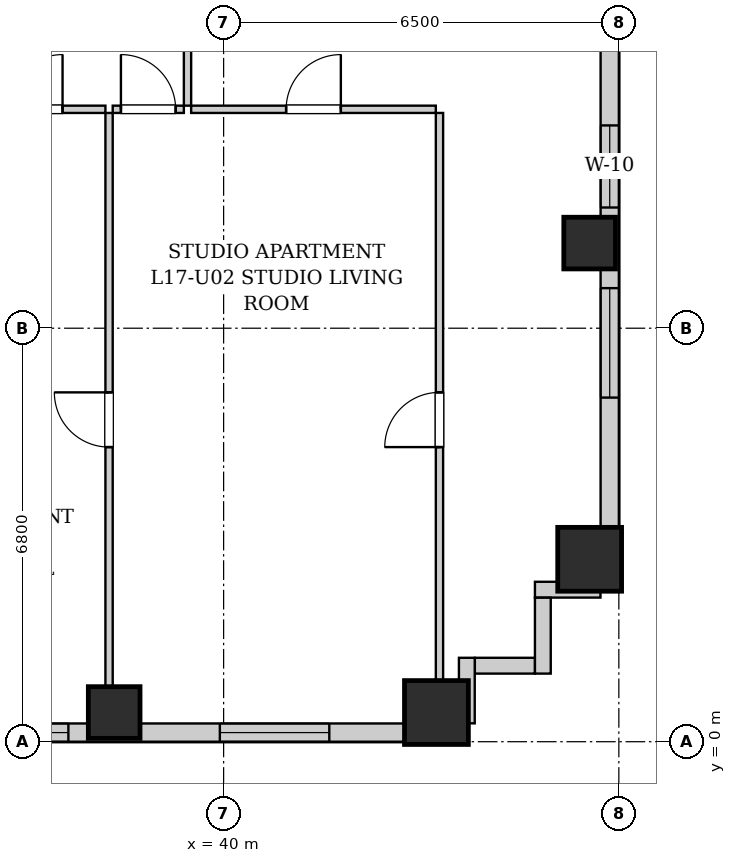
"""IFC4 building model, lengths in metres.
Left out: names, types, materials, properties, quantities, classifications, styles, units other than length and angle.
Written with IfcOpenShell. Run it as: python <this file> out.ifc"""

import sys

from ifc_helpers import new_model, si_unit, direction, frame, frame_2d, origin, origin_2d, place, context, subcontext, project, spatial, rectangle, extrude, element, fill, save


model = new_model("IFC4")
c1 = context("Model", 3, precision=1e-05, world=origin(), true_north=direction((0.0, 1.0)))
c2 = subcontext(c1, "Body", "Model", "MODEL_VIEW")
j1 = project(units=[si_unit("LENGTHUNIT", "METRE"), si_unit("PLANEANGLEUNIT", "RADIAN")], contexts=[c1])
p1 = place(None, origin())
s1 = spatial("IfcSite", under=j1, at=p1, CompositionType="ELEMENT")
p2 = place(p1, origin())
s2 = spatial("IfcBuilding", under=s1, at=p2, CompositionType="ELEMENT")
p3 = place(p2, frame((0.0, 0.0, 64.2)))
s3 = spatial("IfcBuildingStorey", under=s2, at=p3, CompositionType="ELEMENT", Elevation=64.2)
p4 = place(p3, frame((38.2, 0.48, 0.0), z_axis=(0.0, 0.0, 1.0), x_axis=(1.0, 0.0, 0.0)))
e1 = element("IfcColumn", 1, at=p4, inside=s3, PredefinedType="COLUMN", context=c2, shape_type="SweptSolid", body=[
    extrude(rectangle(XDim=0.85, YDim=0.85, at=origin_2d()), origin(), (0.0, 0.0, 1.0), 3.2),
])
for number, where, z_axis, x_axis in (
    (2, (43.5, 0.48, 0.0), (0.0, 0.0, 1.0), (1.0, 0.0, 0.0)),
    (3, (46.02, 3.0, 0.0), (0.0, 0.0, 1.0), (1.0, 0.0, 0.0)),
):
    element("IfcColumn", number, at=place(p3, frame(where, z_axis=z_axis, x_axis=x_axis)), inside=s3, PredefinedType="COLUMN", context=c2, shape_type="SweptSolid", body=[
        extrude(rectangle(XDim=1.05, YDim=1.05, at=origin_2d()), origin(), (0.0, 0.0, 1.0), 3.2),
    ])
p5 = place(p3, frame((46.02, 8.2, 0.0), z_axis=(0.0, 0.0, 1.0), x_axis=(1.0, 0.0, 0.0)))
e4 = element("IfcColumn", 4, at=p5, inside=s3, PredefinedType="COLUMN", context=c2, shape_type="SweptSolid", body=[
    extrude(rectangle(XDim=0.85, YDim=0.85, at=origin_2d()), origin(), (0.0, 0.0, 1.0), 3.2),
])
p6 = place(p3, frame((46.35, 24.6, 0.0), z_axis=(0.0, 0.0, 1.0), x_axis=(0.0, -1.0, 0.0)))
e5 = element("IfcWall", 5, at=p6, inside=s3, PredefinedType="SOLIDWALL", context=c2, shape_type="SweptSolid", body=[
    extrude(rectangle(XDim=22.1, YDim=0.3, at=frame_2d((11.05, 0.0))), origin(), (0.0, 0.0, 1.0), 1.975),
])
p7 = place(p6, frame((17.141, 0.0, 0.55)))
e6 = element("IfcOpeningElement", 6, at=p7, cuts=e5, PredefinedType="OPENING", context=c2, shape_type="SweptSolid", body=[
    extrude(rectangle(XDim=1.8, YDim=1.2, at=frame_2d((0.9, 0.6))), frame((0.0, 0.16, 0.0), z_axis=(0.0, -1.0, 0.0), x_axis=(1.0, 0.0, 0.0)), (0.0, 0.0, 1.0), 0.32),
])
p8 = place(p6, frame((14.465, 0.0, 0.55)))
e7 = element("IfcOpeningElement", 7, at=p8, cuts=e5, PredefinedType="OPENING", context=c2, shape_type="SweptSolid", body=[
    extrude(rectangle(XDim=1.35, YDim=1.2, at=frame_2d((0.675, 0.6))), frame((0.0, 0.16, 0.0), z_axis=(0.0, -1.0, 0.0), x_axis=(1.0, 0.0, 0.0)), (0.0, 0.0, 1.0), 0.32),
])
p9 = place(p3, frame((44.0, 0.15, 0.0), z_axis=(0.0, 0.0, 1.0), x_axis=(-1.0, 0.0, 0.0)))
e8 = element("IfcWall", 8, at=p9, inside=s3, PredefinedType="SOLIDWALL", context=c2, shape_type="SweptSolid", body=[
    extrude(rectangle(XDim=26.35, YDim=0.3, at=frame_2d((13.175, 0.0))), origin(), (0.0, 0.0, 1.0), 1.975),
])
p10 = place(p9, frame((22.665, 0.0, 0.55)))
e9 = element("IfcOpeningElement", 9, at=p10, cuts=e8, PredefinedType="OPENING", context=c2, shape_type="SweptSolid", body=[
    extrude(rectangle(XDim=1.8, YDim=1.2, at=frame_2d((0.9, 0.6))), frame((0.0, 0.16, 0.0), z_axis=(0.0, -1.0, 0.0), x_axis=(1.0, 0.0, 0.0)), (0.0, 0.0, 1.0), 0.32),
])
p11 = place(p9, frame((15.82, 0.0, 0.55)))
e10 = element("IfcOpeningElement", 10, at=p11, cuts=e8, PredefinedType="OPENING", context=c2, shape_type="SweptSolid", body=[
    extrude(rectangle(XDim=0.68, YDim=1.2, at=frame_2d((0.34, 0.6))), frame((0.0, 0.16, 0.0), z_axis=(0.0, -1.0, 0.0), x_axis=(1.0, 0.0, 0.0)), (0.0, 0.0, 1.0), 0.32),
])
p12 = place(p9, frame((13.027, 0.0, 0.55)))
e11 = element("IfcOpeningElement", 11, at=p12, cuts=e8, PredefinedType="OPENING", context=c2, shape_type="SweptSolid", body=[
    extrude(rectangle(XDim=1.8, YDim=1.2, at=frame_2d((0.9, 0.6))), frame((0.0, 0.16, 0.0), z_axis=(0.0, -1.0, 0.0), x_axis=(1.0, 0.0, 0.0)), (0.0, 0.0, 1.0), 0.32),
])
p13 = place(p9, frame((9.365, 0.0, 0.55)))
e12 = element("IfcOpeningElement", 12, at=p13, cuts=e8, PredefinedType="OPENING", context=c2, shape_type="SweptSolid", body=[
    extrude(rectangle(XDim=0.85, YDim=1.2, at=frame_2d((0.425, 0.6))), frame((0.0, 0.16, 0.0), z_axis=(0.0, -1.0, 0.0), x_axis=(1.0, 0.0, 0.0)), (0.0, 0.0, 1.0), 0.32),
])
p14 = place(p9, frame((6.553, 0.0, 0.55)))
e13 = element("IfcOpeningElement", 13, at=p14, cuts=e8, PredefinedType="OPENING", context=c2, shape_type="SweptSolid", body=[
    extrude(rectangle(XDim=1.8, YDim=1.2, at=frame_2d((0.9, 0.6))), frame((0.0, 0.16, 0.0), z_axis=(0.0, -1.0, 0.0), x_axis=(1.0, 0.0, 0.0)), (0.0, 0.0, 1.0), 0.32),
])
p15 = place(p9, frame((2.262, 0.0, 0.55)))
e14 = element("IfcOpeningElement", 14, at=p15, cuts=e8, PredefinedType="OPENING", context=c2, shape_type="SweptSolid", body=[
    extrude(rectangle(XDim=1.8, YDim=1.2, at=frame_2d((0.9, 0.6))), frame((0.0, 0.16, 0.0), z_axis=(0.0, -1.0, 0.0), x_axis=(1.0, 0.0, 0.0)), (0.0, 0.0, 1.0), 0.32),
])
p16 = place(p3, frame((46.198, 2.5, 0.0), z_axis=(0.0, 0.0, 1.0), x_axis=(-1.0, 0.0, 0.0)))
e15 = element("IfcWall", 15, at=p16, inside=s3, PredefinedType="SOLIDWALL", context=c2, shape_type="SweptSolid", body=[
    extrude(rectangle(XDim=1.078, YDim=0.26, at=frame_2d((0.539, 0.0))), origin(), (0.0, 0.0, 1.0), 2.94),
])
p17 = place(p3, frame((45.25, 2.368, 0.0), z_axis=(0.0, 0.0, 1.0), x_axis=(0.0, -1.0, 0.0)))
e16 = element("IfcWall", 16, at=p17, inside=s3, PredefinedType="SOLIDWALL", context=c2, shape_type="SweptSolid", body=[
    extrude(rectangle(XDim=1.248, YDim=0.26, at=frame_2d((0.624, 0.0))), origin(), (0.0, 0.0, 1.0), 2.94),
])
p18 = place(p3, frame((45.118, 1.25, 0.0), z_axis=(0.0, 0.0, 1.0), x_axis=(-1.0, 0.0, 0.0)))
e17 = element("IfcWall", 17, at=p18, inside=s3, PredefinedType="SOLIDWALL", context=c2, shape_type="SweptSolid", body=[
    extrude(rectangle(XDim=0.986, YDim=0.26, at=frame_2d((0.493, 0.0))), origin(), (0.0, 0.0, 1.0), 2.94),
])
p19 = place(p3, frame((44.0, 1.38, 0.0), z_axis=(0.0, 0.0, 1.0), x_axis=(0.0, -1.0, 0.0)))
e18 = element("IfcWall", 18, at=p19, inside=s3, PredefinedType="SOLIDWALL", context=c2, shape_type="SweptSolid", body=[
    extrude(rectangle(XDim=1.078, YDim=0.26, at=frame_2d((0.539, 0.0))), origin(), (0.0, 0.0, 1.0), 2.94),
])
p20 = place(p3, frame((39.406, 10.46, 0.0), z_axis=(0.0, 0.0, 1.0), x_axis=(0.0, 1.0, 0.0)))
e19 = element("IfcWall", 19, at=p20, inside=s3, PredefinedType="PARTITIONING", context=c2, shape_type="SweptSolid", body=[
    extrude(rectangle(XDim=2.85, YDim=0.12, at=frame_2d((1.425, 0.0))), origin(), (0.0, 0.0, 1.0), 2.94),
])
p21 = place(p20, frame((0.975, 0.0, 0.0)))
e20 = element("IfcOpeningElement", 20, at=p21, cuts=e19, PredefinedType="OPENING", context=c2, shape_type="SweptSolid", body=[
    extrude(rectangle(XDim=0.9, YDim=2.05, at=frame_2d((0.45, 1.025))), frame((0.0, 0.07, 0.0), z_axis=(0.0, -1.0, 0.0), x_axis=(1.0, 0.0, 0.0)), (0.0, 0.0, 1.0), 0.14),
])
p22 = place(p3, frame((35.746, 10.4, 0.0), z_axis=(0.0, 0.0, 1.0), x_axis=(1.0, 0.0, 0.0)))
e21 = element("IfcWall", 21, at=p22, inside=s3, PredefinedType="PARTITIONING", context=c2, shape_type="SweptSolid", body=[
    extrude(rectangle(XDim=2.31, YDim=0.12, at=frame_2d((1.155, 0.0))), origin(), (0.0, 0.0, 1.0), 2.94),
])
p23 = place(p22, frame((0.705, 0.0, 0.0)))
e22 = element("IfcOpeningElement", 22, at=p23, cuts=e21, PredefinedType="OPENING", context=c2, shape_type="SweptSolid", body=[
    extrude(rectangle(XDim=0.9, YDim=2.05, at=frame_2d((0.45, 1.025))), frame((0.0, 0.07, 0.0), z_axis=(0.0, -1.0, 0.0), x_axis=(1.0, 0.0, 0.0)), (0.0, 0.0, 1.0), 0.14),
])
p24 = place(p3, frame((38.176, 10.4, 0.0), z_axis=(0.0, 0.0, 1.0), x_axis=(1.0, 0.0, 0.0)))
e23 = element("IfcWall", 23, at=p24, inside=s3, PredefinedType="PARTITIONING", context=c2, shape_type="SweptSolid", body=[
    extrude(rectangle(XDim=1.17, YDim=0.12, at=frame_2d((0.585, 0.0))), origin(), (0.0, 0.0, 1.0), 2.94),
])
p25 = place(p24, frame((0.135, 0.0, 0.0)))
e24 = element("IfcOpeningElement", 24, at=p25, cuts=e23, PredefinedType="OPENING", context=c2, shape_type="SweptSolid", body=[
    extrude(rectangle(XDim=0.9, YDim=2.05, at=frame_2d((0.45, 1.025))), frame((0.0, 0.07, 0.0), z_axis=(0.0, -1.0, 0.0), x_axis=(1.0, 0.0, 0.0)), (0.0, 0.0, 1.0), 0.14),
])
p26 = place(p3, frame((39.466, 10.4, 0.0), z_axis=(0.0, 0.0, 1.0), x_axis=(1.0, 0.0, 0.0)))
e25 = element("IfcWall", 25, at=p26, inside=s3, PredefinedType="PARTITIONING", context=c2, shape_type="SweptSolid", body=[
    extrude(rectangle(XDim=4.024, YDim=0.12, at=frame_2d((2.012, 0.0))), origin(), (0.0, 0.0, 1.0), 2.94),
])
p27 = place(p26, frame((1.562, 0.0, 0.0)))
e26 = element("IfcOpeningElement", 26, at=p27, cuts=e25, PredefinedType="OPENING", context=c2, shape_type="SweptSolid", body=[
    extrude(rectangle(XDim=0.9, YDim=2.05, at=frame_2d((0.45, 1.025))), frame((0.0, 0.07, 0.0), z_axis=(0.0, -1.0, 0.0), x_axis=(1.0, 0.0, 0.0)), (0.0, 0.0, 1.0), 0.14),
])
p28 = place(p3, frame((38.116, 0.28, 0.0), z_axis=(0.0, 0.0, 1.0), x_axis=(0.0, 1.0, 0.0)))
e27 = element("IfcWall", 27, at=p28, inside=s3, PredefinedType="PARTITIONING", context=c2, shape_type="SweptSolid", body=[
    extrude(rectangle(XDim=10.06, YDim=0.12, at=frame_2d((5.03, 0.0))), origin(), (0.0, 0.0, 1.0), 2.94),
])
p29 = place(p28, frame((4.565, 0.0, 0.0)))
e28 = element("IfcOpeningElement", 28, at=p29, cuts=e27, PredefinedType="OPENING", context=c2, shape_type="SweptSolid", body=[
    extrude(rectangle(XDim=0.9, YDim=2.05, at=frame_2d((0.45, 1.025))), frame((0.0, 0.07, 0.0), z_axis=(0.0, -1.0, 0.0), x_axis=(1.0, 0.0, 0.0)), (0.0, 0.0, 1.0), 0.14),
])
p30 = place(p3, frame((43.55, 0.28, 0.0), z_axis=(0.0, 0.0, 1.0), x_axis=(0.0, 1.0, 0.0)))
e29 = element("IfcWall", 29, at=p30, inside=s3, PredefinedType="PARTITIONING", context=c2, shape_type="SweptSolid", body=[
    extrude(rectangle(XDim=10.06, YDim=0.12, at=frame_2d((5.03, 0.0))), origin(), (0.0, 0.0, 1.0), 2.94),
])
p31 = place(p30, frame((4.565, 0.0, 0.0)))
e30 = element("IfcOpeningElement", 30, at=p31, cuts=e29, PredefinedType="OPENING", context=c2, shape_type="SweptSolid", body=[
    extrude(rectangle(XDim=0.9, YDim=2.05, at=frame_2d((0.45, 1.025))), frame((0.0, 0.07, 0.0), z_axis=(0.0, -1.0, 0.0), x_axis=(1.0, 0.0, 0.0)), (0.0, 0.0, 1.0), 0.14),
])
p32 = place(p23, origin())
e31 = element("IfcDoor", 31, at=p32, inside=s3, OperationType="SINGLE_SWING_RIGHT", PredefinedType="DOOR", context=c2, shape_type="SweptSolid", body=[
    extrude(rectangle(XDim=0.9, YDim=2.05, at=frame_2d((0.45, 1.025))), frame((0.0, 0.025, 0.0), z_axis=(0.0, -1.0, 0.0), x_axis=(1.0, 0.0, 0.0)), (0.0, 0.0, 1.0), 0.05),
])
fill(e22, e31)
p33 = place(p25, origin())
e32 = element("IfcDoor", 32, at=p33, inside=s3, OperationType="SINGLE_SWING_LEFT", PredefinedType="DOOR", context=c2, shape_type="SweptSolid", body=[
    extrude(rectangle(XDim=0.9, YDim=2.05, at=frame_2d((0.45, 1.025))), frame((0.0, 0.025, 0.0), z_axis=(0.0, -1.0, 0.0), x_axis=(1.0, 0.0, 0.0)), (0.0, 0.0, 1.0), 0.05),
])
fill(e24, e32)
p34 = place(p27, origin())
e33 = element("IfcDoor", 33, at=p34, inside=s3, OperationType="SINGLE_SWING_RIGHT", PredefinedType="DOOR", context=c2, shape_type="SweptSolid", body=[
    extrude(rectangle(XDim=0.9, YDim=2.05, at=frame_2d((0.45, 1.025))), frame((0.0, 0.025, 0.0), z_axis=(0.0, -1.0, 0.0), x_axis=(1.0, 0.0, 0.0)), (0.0, 0.0, 1.0), 0.05),
])
fill(e26, e33)
p35 = place(p29, origin())
e34 = element("IfcDoor", 34, at=p35, inside=s3, OperationType="SINGLE_SWING_RIGHT", PredefinedType="DOOR", context=c2, shape_type="SweptSolid", body=[
    extrude(rectangle(XDim=0.9, YDim=2.05, at=frame_2d((0.45, 1.025))), frame((0.0, 0.025, 0.0), z_axis=(0.0, -1.0, 0.0), x_axis=(1.0, 0.0, 0.0)), (0.0, 0.0, 1.0), 0.05),
])
fill(e28, e34)
p36 = place(p31, origin())
e35 = element("IfcDoor", 35, at=p36, inside=s3, OperationType="SINGLE_SWING_LEFT", PredefinedType="DOOR", context=c2, shape_type="SweptSolid", body=[
    extrude(rectangle(XDim=0.9, YDim=2.05, at=frame_2d((0.45, 1.025))), frame((0.0, 0.025, 0.0), z_axis=(0.0, -1.0, 0.0), x_axis=(1.0, 0.0, 0.0)), (0.0, 0.0, 1.0), 0.05),
])
fill(e30, e35)
p37 = place(p14, origin())
e36 = element("IfcWindow", 36, at=p37, inside=s3, PartitioningType="DOUBLE_PANEL_VERTICAL", PredefinedType="WINDOW", context=c2, shape_type="SweptSolid", body=[
    extrude(rectangle(XDim=1.8, YDim=1.2, at=frame_2d((0.9, 0.6))), frame((0.0, 0.03, 0.0), z_axis=(0.0, -1.0, 0.0), x_axis=(1.0, 0.0, 0.0)), (0.0, 0.0, 1.0), 0.06),
])
fill(e13, e36)
p38 = place(p15, origin())
e37 = element("IfcWindow", 37, at=p38, inside=s3, PartitioningType="DOUBLE_PANEL_VERTICAL", PredefinedType="WINDOW", context=c2, shape_type="SweptSolid", body=[
    extrude(rectangle(XDim=1.8, YDim=1.2, at=frame_2d((0.9, 0.6))), frame((0.0, 0.03, 0.0), z_axis=(0.0, -1.0, 0.0), x_axis=(1.0, 0.0, 0.0)), (0.0, 0.0, 1.0), 0.06),
])
fill(e14, e37)
p39 = place(p7, origin())
e38 = element("IfcWindow", 38, at=p39, inside=s3, PartitioningType="DOUBLE_PANEL_VERTICAL", PredefinedType="WINDOW", context=c2, shape_type="SweptSolid", body=[
    extrude(rectangle(XDim=1.8, YDim=1.2, at=frame_2d((0.9, 0.6))), frame((0.0, 0.03, 0.0), z_axis=(0.0, -1.0, 0.0), x_axis=(1.0, 0.0, 0.0)), (0.0, 0.0, 1.0), 0.06),
])
fill(e6, e38)
p40 = place(p8, origin())
e39 = element("IfcWindow", 39, at=p40, inside=s3, PartitioningType="SINGLE_PANEL", PredefinedType="WINDOW", context=c2, shape_type="SweptSolid", body=[
    extrude(rectangle(XDim=1.35, YDim=1.2, at=frame_2d((0.675, 0.6))), frame((0.0, 0.03, 0.0), z_axis=(0.0, -1.0, 0.0), x_axis=(1.0, 0.0, 0.0)), (0.0, 0.0, 1.0), 0.06),
])
fill(e7, e39)
save(model, sys.argv[1])
